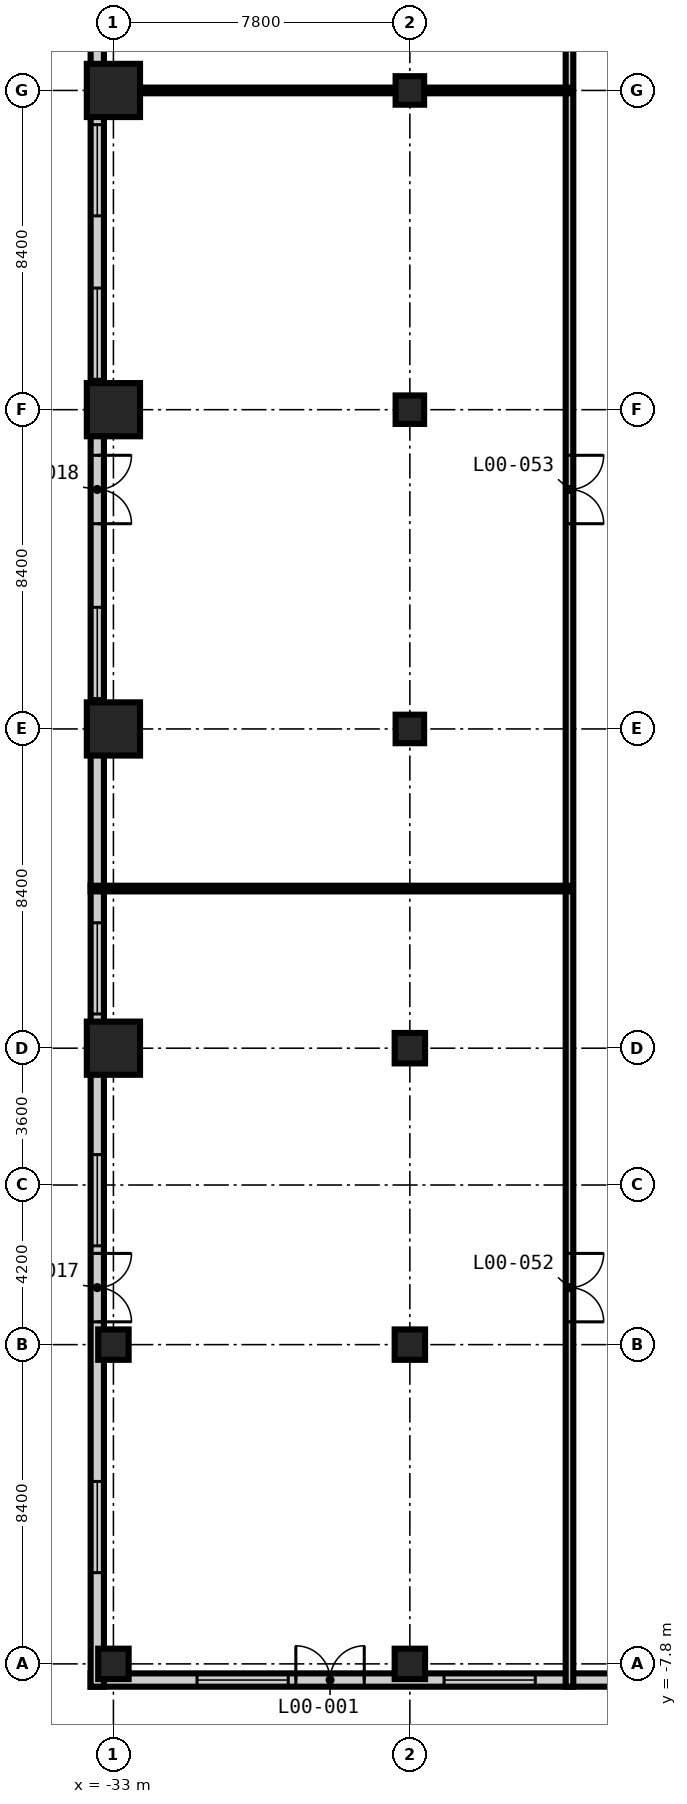
"""IFC4 building model, lengths in metres.
Left out: names, types, materials, properties, quantities, classifications, styles, units other than length and angle.
Written with IfcOpenShell. Run it as: python <this file> out.ifc"""

import sys

from ifc_helpers import new_model, si_unit, direction, frame, frame_2d, origin, origin_2d, place, context, subcontext, project, spatial, rectangle, extrude, element, fill, save


model = new_model("IFC4")
c1 = context("Model", 3, precision=1e-05, world=origin(), true_north=direction((0.0, 1.0)))
c2 = subcontext(c1, "Body", "Model", "MODEL_VIEW")
j1 = project(units=[si_unit("LENGTHUNIT", "METRE"), si_unit("PLANEANGLEUNIT", "RADIAN")], contexts=[c1])
p1 = place(None, origin())
s1 = spatial("IfcSite", under=j1, at=p1, CompositionType="ELEMENT")
p2 = place(p1, origin())
s2 = spatial("IfcBuilding", under=s1, at=p2, CompositionType="ELEMENT")
p3 = place(p2, origin())
s3 = spatial("IfcBuildingStorey", under=s2, at=p3, CompositionType="ELEMENT", Elevation=0.0)
for number, where, z_axis, x_axis in (
    (1, (-33.0, -7.8, -0.5), (0.0, 0.0, 1.0), (1.0, 0.0, 0.0)),
    (2, (-33.0, 0.6, -0.5), (0.0, 0.0, 1.0), (1.0, 0.0, 0.0)),
):
    element("IfcColumn", number, at=place(p3, frame(where, z_axis=z_axis, x_axis=x_axis)), inside=s3, PredefinedType="COLUMN", context=c2, shape_type="SweptSolid", body=[
        extrude(rectangle(XDim=0.8, YDim=0.8, at=origin_2d()), origin(), (0.0, 0.0, 1.0), 6.2),
    ])
p4 = place(p3, frame((-33.0, 8.4, -0.3), z_axis=(0.0, 0.0, 1.0), x_axis=(1.0, 0.0, 0.0)))
e3 = element("IfcColumn", 3, at=p4, inside=s3, PredefinedType="COLUMN", context=c2, shape_type="SweptSolid", body=[
    extrude(rectangle(XDim=1.4, YDim=1.4, at=origin_2d()), origin(), (0.0, 0.0, 1.0), 6.0),
])
for number, where, z_axis, x_axis in (
    (4, (-33.0, 16.8, -0.5), (0.0, 0.0, 1.0), (1.0, 0.0, 0.0)),
    (5, (-33.0, 25.2, -0.5), (0.0, 0.0, 1.0), (1.0, 0.0, 0.0)),
    (6, (-33.0, 33.6, -0.5), (0.0, 0.0, 1.0), (1.0, 0.0, 0.0)),
):
    element("IfcColumn", number, at=place(p3, frame(where, z_axis=z_axis, x_axis=x_axis)), inside=s3, PredefinedType="COLUMN", context=c2, shape_type="SweptSolid", body=[
        extrude(rectangle(XDim=1.4, YDim=1.4, at=origin_2d()), origin(), (0.0, 0.0, 1.0), 6.2),
    ])
for number, where, z_axis, x_axis in (
    (7, (-25.2, -7.8, -0.5), (0.0, 0.0, 1.0), (1.0, 0.0, 0.0)),
    (8, (-25.2, 0.6, -0.5), (0.0, 0.0, 1.0), (1.0, 0.0, 0.0)),
):
    element("IfcColumn", number, at=place(p3, frame(where, z_axis=z_axis, x_axis=x_axis)), inside=s3, PredefinedType="COLUMN", context=c2, shape_type="SweptSolid", body=[
        extrude(rectangle(XDim=0.8, YDim=0.8, at=origin_2d()), origin(), (0.0, 0.0, 1.0), 6.2),
    ])
p5 = place(p3, frame((-25.2, 8.4, -0.3), z_axis=(0.0, 0.0, 1.0), x_axis=(1.0, 0.0, 0.0)))
e9 = element("IfcColumn", 9, at=p5, inside=s3, PredefinedType="COLUMN", context=c2, shape_type="SweptSolid", body=[
    extrude(rectangle(XDim=0.8, YDim=0.8, at=origin_2d()), origin(), (0.0, 0.0, 1.0), 6.0),
])
for number, where, z_axis, x_axis in (
    (10, (-25.2, 16.8, -0.5), (0.0, 0.0, 1.0), (1.0, 0.0, 0.0)),
    (11, (-25.2, 25.2, -0.5), (0.0, 0.0, 1.0), (1.0, 0.0, 0.0)),
    (12, (-25.2, 33.6, -0.5), (0.0, 0.0, 1.0), (1.0, 0.0, 0.0)),
):
    element("IfcColumn", number, at=place(p3, frame(where, z_axis=z_axis, x_axis=x_axis)), inside=s3, PredefinedType="COLUMN", context=c2, shape_type="SweptSolid", body=[
        extrude(rectangle(XDim=0.75, YDim=0.75, at=origin_2d()), origin(), (0.0, 0.0, 1.0), 6.2),
    ])
p6 = place(p3, frame((-33.6, -8.225, 0.0), z_axis=(0.0, 0.0, 1.0), x_axis=(1.0, 0.0, 0.0)))
e13 = element("IfcWall", 13, at=p6, inside=s3, PredefinedType="SOLIDWALL", context=c2, shape_type="SweptSolid", body=[
    extrude(rectangle(XDim=92.4, YDim=0.35, at=frame_2d((46.2, 0.0))), origin(), (0.0, 0.0, 1.0), 5.7),
])
p7 = place(p6, frame((5.4, 0.0, 0.0)))
e14 = element("IfcOpeningElement", 14, at=p7, cuts=e13, PredefinedType="OPENING", context=c2, shape_type="SweptSolid", body=[
    extrude(rectangle(XDim=1.8, YDim=2.7, at=frame_2d((0.9, 1.35))), frame((0.0, 0.185, 0.0), z_axis=(0.0, -1.0, 0.0), x_axis=(1.0, 0.0, 0.0)), (0.0, 0.0, 1.0), 0.37),
])
p8 = place(p6, frame((2.8, 0.0, 0.9)))
e15 = element("IfcOpeningElement", 15, at=p8, cuts=e13, PredefinedType="OPENING", context=c2, shape_type="SweptSolid", body=[
    extrude(rectangle(XDim=2.4, YDim=2.4, at=frame_2d((1.2, 1.2))), frame((0.0, 0.185, 0.0), z_axis=(0.0, -1.0, 0.0), x_axis=(1.0, 0.0, 0.0)), (0.0, 0.0, 1.0), 0.37),
])
p9 = place(p6, frame((9.3, 0.0, 0.9)))
e16 = element("IfcOpeningElement", 16, at=p9, cuts=e13, PredefinedType="OPENING", context=c2, shape_type="SweptSolid", body=[
    extrude(rectangle(XDim=2.4, YDim=2.4, at=frame_2d((1.2, 1.2))), frame((0.0, 0.185, 0.0), z_axis=(0.0, -1.0, 0.0), x_axis=(1.0, 0.0, 0.0)), (0.0, 0.0, 1.0), 0.37),
])
p10 = place(p6, frame((13.8, 0.0, 0.9)))
e17 = element("IfcOpeningElement", 17, at=p10, cuts=e13, PredefinedType="OPENING", context=c2, shape_type="SweptSolid", body=[
    extrude(rectangle(XDim=2.4, YDim=2.4, at=frame_2d((1.2, 1.2))), frame((0.0, 0.185, 0.0), z_axis=(0.0, -1.0, 0.0), x_axis=(1.0, 0.0, 0.0)), (0.0, 0.0, 1.0), 0.37),
])
p11 = place(p6, frame((19.3, 0.0, 0.0)))
e18 = element("IfcOpeningElement", 18, at=p11, cuts=e13, PredefinedType="OPENING", context=c2, shape_type="SweptSolid", body=[
    extrude(rectangle(XDim=1.2, YDim=2.4, at=frame_2d((0.6, 1.2))), frame((0.0, 0.185, 0.0), z_axis=(0.0, -1.0, 0.0), x_axis=(1.0, 0.0, 0.0)), (0.0, 0.0, 1.0), 0.37),
])
p12 = place(p6, frame((26.8, 0.0, 0.0)))
e19 = element("IfcOpeningElement", 19, at=p12, cuts=e13, PredefinedType="OPENING", context=c2, shape_type="SweptSolid", body=[
    extrude(rectangle(XDim=2.4, YDim=3.0, at=frame_2d((1.2, 1.5))), frame((0.0, 0.185, 0.0), z_axis=(0.0, -1.0, 0.0), x_axis=(1.0, 0.0, 0.0)), (0.0, 0.0, 1.0), 0.37),
])
p13 = place(p6, frame((36.9, 0.0, 0.0)))
e20 = element("IfcOpeningElement", 20, at=p13, cuts=e13, PredefinedType="OPENING", context=c2, shape_type="SweptSolid", body=[
    extrude(rectangle(XDim=1.8, YDim=2.4, at=frame_2d((0.9, 1.2))), frame((0.0, 0.185, 0.0), z_axis=(0.0, -1.0, 0.0), x_axis=(1.0, 0.0, 0.0)), (0.0, 0.0, 1.0), 0.37),
])
p14 = place(p6, frame((38.9, 0.0, 0.9)))
e21 = element("IfcOpeningElement", 21, at=p14, cuts=e13, PredefinedType="OPENING", context=c2, shape_type="SweptSolid", body=[
    extrude(rectangle(XDim=2.4, YDim=2.4, at=frame_2d((1.2, 1.2))), frame((0.0, 0.185, 0.0), z_axis=(0.0, -1.0, 0.0), x_axis=(1.0, 0.0, 0.0)), (0.0, 0.0, 1.0), 0.37),
])
p15 = place(p6, frame((53.7, 0.0, 0.0)))
e22 = element("IfcOpeningElement", 22, at=p15, cuts=e13, PredefinedType="OPENING", context=c2, shape_type="SweptSolid", body=[
    extrude(rectangle(XDim=1.8, YDim=2.4, at=frame_2d((0.9, 1.2))), frame((0.0, 0.185, 0.0), z_axis=(0.0, -1.0, 0.0), x_axis=(1.0, 0.0, 0.0)), (0.0, 0.0, 1.0), 0.37),
])
p16 = place(p6, frame((51.1, 0.0, 0.9)))
e23 = element("IfcOpeningElement", 23, at=p16, cuts=e13, PredefinedType="OPENING", context=c2, shape_type="SweptSolid", body=[
    extrude(rectangle(XDim=2.4, YDim=2.4, at=frame_2d((1.2, 1.2))), frame((0.0, 0.185, 0.0), z_axis=(0.0, -1.0, 0.0), x_axis=(1.0, 0.0, 0.0)), (0.0, 0.0, 1.0), 0.37),
])
p17 = place(p6, frame((61.8, 0.0, 0.0)))
e24 = element("IfcOpeningElement", 24, at=p17, cuts=e13, PredefinedType="OPENING", context=c2, shape_type="SweptSolid", body=[
    extrude(rectangle(XDim=2.4, YDim=3.0, at=frame_2d((1.2, 1.5))), frame((0.0, 0.185, 0.0), z_axis=(0.0, -1.0, 0.0), x_axis=(1.0, 0.0, 0.0)), (0.0, 0.0, 1.0), 0.37),
])
p18 = place(p6, frame((72.7, 0.0, 0.9)))
e25 = element("IfcOpeningElement", 25, at=p18, cuts=e13, PredefinedType="OPENING", context=c2, shape_type="SweptSolid", body=[
    extrude(rectangle(XDim=2.4, YDim=2.4, at=frame_2d((1.2, 1.2))), frame((0.0, 0.185, 0.0), z_axis=(0.0, -1.0, 0.0), x_axis=(1.0, 0.0, 0.0)), (0.0, 0.0, 1.0), 0.37),
])
p19 = place(p6, frame((81.1, 0.0, 0.9)))
e26 = element("IfcOpeningElement", 26, at=p19, cuts=e13, PredefinedType="OPENING", context=c2, shape_type="SweptSolid", body=[
    extrude(rectangle(XDim=2.4, YDim=2.4, at=frame_2d((1.2, 1.2))), frame((0.0, 0.185, 0.0), z_axis=(0.0, -1.0, 0.0), x_axis=(1.0, 0.0, 0.0)), (0.0, 0.0, 1.0), 0.37),
])
p20 = place(p6, frame((88.9, 0.0, 0.9)))
e27 = element("IfcOpeningElement", 27, at=p20, cuts=e13, PredefinedType="OPENING", context=c2, shape_type="SweptSolid", body=[
    extrude(rectangle(XDim=2.4, YDim=2.4, at=frame_2d((1.2, 1.2))), frame((0.0, 0.185, 0.0), z_axis=(0.0, -1.0, 0.0), x_axis=(1.0, 0.0, 0.0)), (0.0, 0.0, 1.0), 0.37),
])
p21 = place(p3, frame((-33.425, 58.8, 0.0), z_axis=(0.0, 0.0, 1.0), x_axis=(0.0, -1.0, 0.0)))
e28 = element("IfcWall", 28, at=p21, inside=s3, PredefinedType="SOLIDWALL", context=c2, shape_type="SweptSolid", body=[
    extrude(rectangle(XDim=67.2, YDim=0.35, at=frame_2d((33.6, 0.0))), origin(), (0.0, 0.0, 1.0), 5.7),
])
p22 = place(p21, frame((55.8, 0.0, 0.0)))
e29 = element("IfcOpeningElement", 29, at=p22, cuts=e28, PredefinedType="OPENING", context=c2, shape_type="SweptSolid", body=[
    extrude(rectangle(XDim=1.8, YDim=2.7, at=frame_2d((0.9, 1.35))), frame((0.0, 0.185, 0.0), z_axis=(0.0, -1.0, 0.0), x_axis=(1.0, 0.0, 0.0)), (0.0, 0.0, 1.0), 0.37),
])
p23 = place(p21, frame((61.8, 0.0, 0.9)))
e30 = element("IfcOpeningElement", 30, at=p23, cuts=e28, PredefinedType="OPENING", context=c2, shape_type="SweptSolid", body=[
    extrude(rectangle(XDim=2.4, YDim=2.4, at=frame_2d((1.2, 1.2))), frame((0.0, 0.185, 0.0), z_axis=(0.0, -1.0, 0.0), x_axis=(1.0, 0.0, 0.0)), (0.0, 0.0, 1.0), 0.37),
])
p24 = place(p21, frame((53.2, 0.0, 0.9)))
e31 = element("IfcOpeningElement", 31, at=p24, cuts=e28, PredefinedType="OPENING", context=c2, shape_type="SweptSolid", body=[
    extrude(rectangle(XDim=2.4, YDim=2.4, at=frame_2d((1.2, 1.2))), frame((0.0, 0.185, 0.0), z_axis=(0.0, -1.0, 0.0), x_axis=(1.0, 0.0, 0.0)), (0.0, 0.0, 1.0), 0.37),
])
p25 = place(p21, frame((47.1, 0.0, 0.9)))
e32 = element("IfcOpeningElement", 32, at=p25, cuts=e28, PredefinedType="OPENING", context=c2, shape_type="SweptSolid", body=[
    extrude(rectangle(XDim=2.4, YDim=2.4, at=frame_2d((1.2, 1.2))), frame((0.0, 0.185, 0.0), z_axis=(0.0, -1.0, 0.0), x_axis=(1.0, 0.0, 0.0)), (0.0, 0.0, 1.0), 0.37),
])
p26 = place(p21, frame((34.8, 0.0, 0.0)))
e33 = element("IfcOpeningElement", 33, at=p26, cuts=e28, PredefinedType="OPENING", context=c2, shape_type="SweptSolid", body=[
    extrude(rectangle(XDim=1.8, YDim=2.7, at=frame_2d((0.9, 1.35))), frame((0.0, 0.185, 0.0), z_axis=(0.0, -1.0, 0.0), x_axis=(1.0, 0.0, 0.0)), (0.0, 0.0, 1.0), 0.37),
])
p27 = place(p21, frame((38.8, 0.0, 0.9)))
e34 = element("IfcOpeningElement", 34, at=p27, cuts=e28, PredefinedType="OPENING", context=c2, shape_type="SweptSolid", body=[
    extrude(rectangle(XDim=2.4, YDim=2.4, at=frame_2d((1.2, 1.2))), frame((0.0, 0.185, 0.0), z_axis=(0.0, -1.0, 0.0), x_axis=(1.0, 0.0, 0.0)), (0.0, 0.0, 1.0), 0.37),
])
p28 = place(p21, frame((30.4, 0.0, 0.9)))
e35 = element("IfcOpeningElement", 35, at=p28, cuts=e28, PredefinedType="OPENING", context=c2, shape_type="SweptSolid", body=[
    extrude(rectangle(XDim=2.4, YDim=2.4, at=frame_2d((1.2, 1.2))), frame((0.0, 0.185, 0.0), z_axis=(0.0, -1.0, 0.0), x_axis=(1.0, 0.0, 0.0)), (0.0, 0.0, 1.0), 0.37),
])
p29 = place(p21, frame((26.1, 0.0, 0.9)))
e36 = element("IfcOpeningElement", 36, at=p29, cuts=e28, PredefinedType="OPENING", context=c2, shape_type="SweptSolid", body=[
    extrude(rectangle(XDim=2.4, YDim=2.4, at=frame_2d((1.2, 1.2))), frame((0.0, 0.185, 0.0), z_axis=(0.0, -1.0, 0.0), x_axis=(1.0, 0.0, 0.0)), (0.0, 0.0, 1.0), 0.37),
])
p30 = place(p21, frame((11.7, 0.0, 0.0)))
e37 = element("IfcOpeningElement", 37, at=p30, cuts=e28, PredefinedType="OPENING", context=c2, shape_type="SweptSolid", body=[
    extrude(rectangle(XDim=1.8, YDim=2.7, at=frame_2d((0.9, 1.35))), frame((0.0, 0.185, 0.0), z_axis=(0.0, -1.0, 0.0), x_axis=(1.0, 0.0, 0.0)), (0.0, 0.0, 1.0), 0.37),
])
p31 = place(p21, frame((19.8, 0.0, 0.9)))
e38 = element("IfcOpeningElement", 38, at=p31, cuts=e28, PredefinedType="OPENING", context=c2, shape_type="SweptSolid", body=[
    extrude(rectangle(XDim=2.4, YDim=2.4, at=frame_2d((1.2, 1.2))), frame((0.0, 0.185, 0.0), z_axis=(0.0, -1.0, 0.0), x_axis=(1.0, 0.0, 0.0)), (0.0, 0.0, 1.0), 0.37),
])
p32 = place(p21, frame((9.1, 0.0, 0.9)))
e39 = element("IfcOpeningElement", 39, at=p32, cuts=e28, PredefinedType="OPENING", context=c2, shape_type="SweptSolid", body=[
    extrude(rectangle(XDim=2.4, YDim=2.4, at=frame_2d((1.2, 1.2))), frame((0.0, 0.185, 0.0), z_axis=(0.0, -1.0, 0.0), x_axis=(1.0, 0.0, 0.0)), (0.0, 0.0, 1.0), 0.37),
])
p33 = place(p21, frame((3.0, 0.0, 0.9)))
e40 = element("IfcOpeningElement", 40, at=p33, cuts=e28, PredefinedType="OPENING", context=c2, shape_type="SweptSolid", body=[
    extrude(rectangle(XDim=2.4, YDim=2.4, at=frame_2d((1.2, 1.2))), frame((0.0, 0.185, 0.0), z_axis=(0.0, -1.0, 0.0), x_axis=(1.0, 0.0, 0.0)), (0.0, 0.0, 1.0), 0.37),
])
p34 = place(p3, frame((-21.0, 58.8, 0.0), z_axis=(0.0, 0.0, 1.0), x_axis=(0.0, -1.0, 0.0)))
e41 = element("IfcWall", 41, at=p34, inside=s3, PredefinedType="PARTITIONING", context=c2, shape_type="SweptSolid", body=[
    extrude(rectangle(XDim=67.2, YDim=0.2, at=frame_2d((33.6, 0.0))), origin(), (0.0, 0.0, 1.0), 5.7),
])
p35 = place(p34, frame((55.8, 0.0, 0.0)))
e42 = element("IfcOpeningElement", 42, at=p35, cuts=e41, PredefinedType="OPENING", context=c2, shape_type="SweptSolid", body=[
    extrude(rectangle(XDim=1.8, YDim=2.7, at=frame_2d((0.9, 1.35))), frame((0.0, 0.11, 0.0), z_axis=(0.0, -1.0, 0.0), x_axis=(1.0, 0.0, 0.0)), (0.0, 0.0, 1.0), 0.22),
])
p36 = place(p34, frame((34.8, 0.0, 0.0)))
e43 = element("IfcOpeningElement", 43, at=p36, cuts=e41, PredefinedType="OPENING", context=c2, shape_type="SweptSolid", body=[
    extrude(rectangle(XDim=1.8, YDim=2.7, at=frame_2d((0.9, 1.35))), frame((0.0, 0.11, 0.0), z_axis=(0.0, -1.0, 0.0), x_axis=(1.0, 0.0, 0.0)), (0.0, 0.0, 1.0), 0.22),
])
p37 = place(p34, frame((11.7, 0.0, 0.0)))
e44 = element("IfcOpeningElement", 44, at=p37, cuts=e41, PredefinedType="OPENING", context=c2, shape_type="SweptSolid", body=[
    extrude(rectangle(XDim=1.8, YDim=2.7, at=frame_2d((0.9, 1.35))), frame((0.0, 0.11, 0.0), z_axis=(0.0, -1.0, 0.0), x_axis=(1.0, 0.0, 0.0)), (0.0, 0.0, 1.0), 0.22),
])
for number, where, z_axis, x_axis in (
    (45, (-33.6, 12.6, 0.0), (0.0, 0.0, 1.0), (1.0, 0.0, 0.0)),
    (46, (-33.6, 33.6, 0.0), (0.0, 0.0, 1.0), (1.0, 0.0, 0.0)),
):
    element("IfcWall", number, at=place(p3, frame(where, z_axis=z_axis, x_axis=x_axis)), inside=s3, PredefinedType="PARTITIONING", context=c2, shape_type="SweptSolid", body=[
        extrude(rectangle(XDim=12.6, YDim=0.15, at=frame_2d((6.3, 0.0))), origin(), (0.0, 0.0, 1.0), 5.7),
    ])
p38 = place(p7, origin())
e47 = element("IfcDoor", 47, at=p38, inside=s3, OperationType="DOUBLE_DOOR_DOUBLE_SWING", PredefinedType="DOOR", context=c2, shape_type="SweptSolid", body=[
    extrude(rectangle(XDim=1.8, YDim=2.7, at=frame_2d((0.9, 1.35))), frame((0.0, 0.025, 0.0), z_axis=(0.0, -1.0, 0.0), x_axis=(1.0, 0.0, 0.0)), (0.0, 0.0, 1.0), 0.05),
])
fill(e14, e47)
p39 = place(p8, origin())
e48 = element("IfcWindow", 48, at=p39, inside=s3, PartitioningType="SINGLE_PANEL", PredefinedType="WINDOW", context=c2, shape_type="SweptSolid", body=[
    extrude(rectangle(XDim=2.4, YDim=2.4, at=frame_2d((1.2, 1.2))), frame((0.0, 0.03, 0.0), z_axis=(0.0, -1.0, 0.0), x_axis=(1.0, 0.0, 0.0)), (0.0, 0.0, 1.0), 0.06),
])
fill(e15, e48)
p40 = place(p9, origin())
e49 = element("IfcWindow", 49, at=p40, inside=s3, PartitioningType="SINGLE_PANEL", PredefinedType="WINDOW", context=c2, shape_type="SweptSolid", body=[
    extrude(rectangle(XDim=2.4, YDim=2.4, at=frame_2d((1.2, 1.2))), frame((0.0, 0.03, 0.0), z_axis=(0.0, -1.0, 0.0), x_axis=(1.0, 0.0, 0.0)), (0.0, 0.0, 1.0), 0.06),
])
fill(e16, e49)
p41 = place(p22, origin())
e50 = element("IfcDoor", 50, at=p41, inside=s3, OperationType="DOUBLE_DOOR_DOUBLE_SWING", PredefinedType="DOOR", context=c2, shape_type="SweptSolid", body=[
    extrude(rectangle(XDim=1.8, YDim=2.7, at=frame_2d((0.9, 1.35))), frame((0.0, 0.025, 0.0), z_axis=(0.0, -1.0, 0.0), x_axis=(1.0, 0.0, 0.0)), (0.0, 0.0, 1.0), 0.05),
])
fill(e29, e50)
p42 = place(p23, origin())
e51 = element("IfcWindow", 51, at=p42, inside=s3, PartitioningType="SINGLE_PANEL", PredefinedType="WINDOW", context=c2, shape_type="SweptSolid", body=[
    extrude(rectangle(XDim=2.4, YDim=2.4, at=frame_2d((1.2, 1.2))), frame((0.0, 0.03, 0.0), z_axis=(0.0, -1.0, 0.0), x_axis=(1.0, 0.0, 0.0)), (0.0, 0.0, 1.0), 0.06),
])
fill(e30, e51)
p43 = place(p24, origin())
e52 = element("IfcWindow", 52, at=p43, inside=s3, PartitioningType="SINGLE_PANEL", PredefinedType="WINDOW", context=c2, shape_type="SweptSolid", body=[
    extrude(rectangle(XDim=2.4, YDim=2.4, at=frame_2d((1.2, 1.2))), frame((0.0, 0.03, 0.0), z_axis=(0.0, -1.0, 0.0), x_axis=(1.0, 0.0, 0.0)), (0.0, 0.0, 1.0), 0.06),
])
fill(e31, e52)
p44 = place(p25, origin())
e53 = element("IfcWindow", 53, at=p44, inside=s3, PartitioningType="SINGLE_PANEL", PredefinedType="WINDOW", context=c2, shape_type="SweptSolid", body=[
    extrude(rectangle(XDim=2.4, YDim=2.4, at=frame_2d((1.2, 1.2))), frame((0.0, 0.03, 0.0), z_axis=(0.0, -1.0, 0.0), x_axis=(1.0, 0.0, 0.0)), (0.0, 0.0, 1.0), 0.06),
])
fill(e32, e53)
p45 = place(p26, origin())
e54 = element("IfcDoor", 54, at=p45, inside=s3, OperationType="DOUBLE_DOOR_DOUBLE_SWING", PredefinedType="DOOR", context=c2, shape_type="SweptSolid", body=[
    extrude(rectangle(XDim=1.8, YDim=2.7, at=frame_2d((0.9, 1.35))), frame((0.0, 0.025, 0.0), z_axis=(0.0, -1.0, 0.0), x_axis=(1.0, 0.0, 0.0)), (0.0, 0.0, 1.0), 0.05),
])
fill(e33, e54)
p46 = place(p27, origin())
e55 = element("IfcWindow", 55, at=p46, inside=s3, PartitioningType="SINGLE_PANEL", PredefinedType="WINDOW", context=c2, shape_type="SweptSolid", body=[
    extrude(rectangle(XDim=2.4, YDim=2.4, at=frame_2d((1.2, 1.2))), frame((0.0, 0.03, 0.0), z_axis=(0.0, -1.0, 0.0), x_axis=(1.0, 0.0, 0.0)), (0.0, 0.0, 1.0), 0.06),
])
fill(e34, e55)
p47 = place(p28, origin())
e56 = element("IfcWindow", 56, at=p47, inside=s3, PartitioningType="SINGLE_PANEL", PredefinedType="WINDOW", context=c2, shape_type="SweptSolid", body=[
    extrude(rectangle(XDim=2.4, YDim=2.4, at=frame_2d((1.2, 1.2))), frame((0.0, 0.03, 0.0), z_axis=(0.0, -1.0, 0.0), x_axis=(1.0, 0.0, 0.0)), (0.0, 0.0, 1.0), 0.06),
])
fill(e35, e56)
p48 = place(p29, origin())
e57 = element("IfcWindow", 57, at=p48, inside=s3, PartitioningType="SINGLE_PANEL", PredefinedType="WINDOW", context=c2, shape_type="SweptSolid", body=[
    extrude(rectangle(XDim=2.4, YDim=2.4, at=frame_2d((1.2, 1.2))), frame((0.0, 0.03, 0.0), z_axis=(0.0, -1.0, 0.0), x_axis=(1.0, 0.0, 0.0)), (0.0, 0.0, 1.0), 0.06),
])
fill(e36, e57)
p49 = place(p35, origin())
e58 = element("IfcDoor", 58, at=p49, inside=s3, OperationType="DOUBLE_DOOR_DOUBLE_SWING", PredefinedType="DOOR", context=c2, shape_type="SweptSolid", body=[
    extrude(rectangle(XDim=1.8, YDim=2.7, at=frame_2d((0.9, 1.35))), frame((0.0, 0.025, 0.0), z_axis=(0.0, -1.0, 0.0), x_axis=(1.0, 0.0, 0.0)), (0.0, 0.0, 1.0), 0.05),
])
fill(e42, e58)
p50 = place(p36, origin())
e59 = element("IfcDoor", 59, at=p50, inside=s3, OperationType="DOUBLE_DOOR_DOUBLE_SWING", PredefinedType="DOOR", context=c2, shape_type="SweptSolid", body=[
    extrude(rectangle(XDim=1.8, YDim=2.7, at=frame_2d((0.9, 1.35))), frame((0.0, 0.025, 0.0), z_axis=(0.0, -1.0, 0.0), x_axis=(1.0, 0.0, 0.0)), (0.0, 0.0, 1.0), 0.05),
])
fill(e43, e59)
save(model, sys.argv[1])
